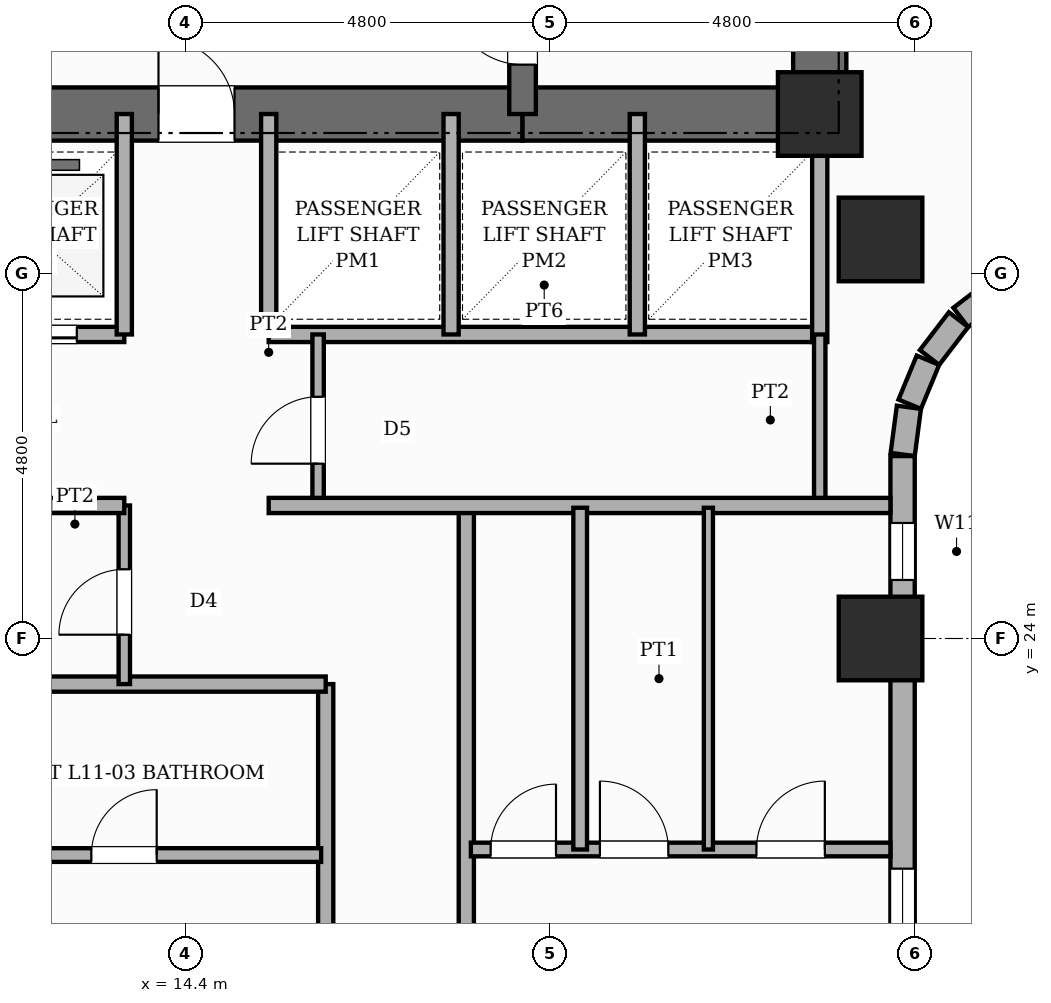
"""IFC4 building model, lengths in metres.
Left out: names, types, materials, properties, quantities, classifications, styles, units other than length and angle.
Written with IfcOpenShell. Run it as: python <this file> out.ifc"""

import sys

from ifc_helpers import new_model, si_unit, direction, frame, frame_2d, origin, origin_2d, place, context, subcontext, project, spatial, rectangle, extrude, element, fill, save


model = new_model("IFC4")
c1 = context("Model", 3, precision=1e-05, world=origin(), true_north=direction((0.0, 1.0)))
c2 = subcontext(c1, "Body", "Model", "MODEL_VIEW")
j1 = project(units=[si_unit("LENGTHUNIT", "METRE"), si_unit("PLANEANGLEUNIT", "RADIAN")], contexts=[c1])
p1 = place(None, origin())
s1 = spatial("IfcSite", under=j1, at=p1, CompositionType="ELEMENT")
p2 = place(p1, origin())
s2 = spatial("IfcBuilding", under=s1, at=p2, CompositionType="ELEMENT")
p3 = place(p2, frame((0.0, 0.0, 46.6)))
s3 = spatial("IfcBuildingStorey", under=s2, at=p3, CompositionType="ELEMENT", Elevation=46.6)
p4 = place(p3, frame((22.75, 30.55, 0.0), z_axis=(0.0, 0.0, 1.0), x_axis=(0.0, 1.0, 0.0)))
e1 = element("IfcWall", 1, at=p4, inside=s3, PredefinedType="SHEAR", context=c2, shape_type="SweptSolid", body=[
    extrude(rectangle(XDim=15.6, YDim=0.7, at=frame_2d((7.8, 0.0))), origin(), (0.0, 0.0, 1.0), 3.6),
])
p5 = place(p4, frame((10.8, 0.0, 0.0)))
e2 = element("IfcOpeningElement", 2, at=p5, cuts=e1, PredefinedType="OPENING", context=c2, shape_type="SweptSolid", body=[
    extrude(rectangle(XDim=1.0, YDim=2.15, at=frame_2d((0.5, 1.075))), frame((0.0, 0.36, 0.0), z_axis=(0.0, -1.0, 0.0), x_axis=(1.0, 0.0, 0.0)), (0.0, 0.0, 1.0), 0.72),
])
p6 = place(p3, frame((9.96, 30.9, 0.0), z_axis=(0.0, 0.0, 1.0), x_axis=(1.0, 0.0, 0.0)))
e3 = element("IfcWall", 3, at=p6, inside=s3, PredefinedType="SHEAR", context=c2, shape_type="SweptSolid", body=[
    extrude(rectangle(XDim=8.88, YDim=0.7, at=frame_2d((4.44, 0.0))), origin(), (0.0, 0.0, 1.0), 3.6),
])
p7 = place(p6, frame((4.09, 0.0, 0.0)))
e4 = element("IfcOpeningElement", 4, at=p7, cuts=e3, PredefinedType="OPENING", context=c2, shape_type="SweptSolid", body=[
    extrude(rectangle(XDim=1.0, YDim=2.15, at=frame_2d((0.5, 1.075))), frame((0.0, 0.36, 0.0), z_axis=(0.0, -1.0, 0.0), x_axis=(1.0, 0.0, 0.0)), (0.0, 0.0, 1.0), 0.72),
])
p8 = place(p3, frame((18.84, 30.9, 0.0), z_axis=(0.0, 0.0, 1.0), x_axis=(1.0, 0.0, 0.0)))
e5 = element("IfcWall", 5, at=p8, inside=s3, PredefinedType="SHEAR", context=c2, shape_type="SweptSolid", body=[
    extrude(rectangle(XDim=3.91, YDim=0.7, at=frame_2d((1.955, 0.0))), origin(), (0.0, 0.0, 1.0), 3.6),
])
p9 = place(p3, frame((18.84, 30.9, 0.0), z_axis=(0.0, 0.0, 1.0), x_axis=(0.0, 1.0, 0.0)))
e6 = element("IfcWall", 6, at=p9, inside=s3, PredefinedType="SHEAR", context=c2, shape_type="SweptSolid", body=[
    extrude(rectangle(XDim=14.9, YDim=0.35, at=frame_2d((7.45, 0.0))), origin(), (0.0, 0.0, 1.0), 3.6),
])
p10 = place(p9, frame((0.65, 0.0, 0.0)))
e7 = element("IfcOpeningElement", 7, at=p10, cuts=e6, PredefinedType="OPENING", context=c2, shape_type="SweptSolid", body=[
    extrude(rectangle(XDim=0.95, YDim=2.1, at=frame_2d((0.475, 1.05))), frame((0.0, 0.185, 0.0), z_axis=(0.0, -1.0, 0.0), x_axis=(1.0, 0.0, 0.0)), (0.0, 0.0, 1.0), 0.37),
])
p11 = place(p9, frame((10.45, 0.0, 0.0)))
e8 = element("IfcOpeningElement", 8, at=p11, cuts=e6, PredefinedType="OPENING", context=c2, shape_type="SweptSolid", body=[
    extrude(rectangle(XDim=1.0, YDim=2.15, at=frame_2d((0.5, 1.075))), frame((0.0, 0.185, 0.0), z_axis=(0.0, -1.0, 0.0), x_axis=(1.0, 0.0, 0.0)), (0.0, 0.0, 1.0), 0.37),
])
for number, where, z_axis, x_axis in (
    (9, (22.75, 30.9, 0.0), (0.0, 0.0, 1.0), (1.0, 0.0, 0.0)),
    (10, (23.55, 24.0, 0.0), (0.0, 0.0, 1.0), (1.0, 0.0, 0.0)),
    (11, (23.55, 29.25, 0.0), (0.0, 0.0, 1.0), (1.0, 0.0, 0.0)),
):
    element("IfcColumn", number, at=place(p3, frame(where, z_axis=z_axis, x_axis=x_axis)), inside=s3, PredefinedType="COLUMN", context=c2, shape_type="SweptSolid", body=[
        extrude(rectangle(XDim=1.1, YDim=1.1, at=origin_2d()), origin(), (0.0, 0.0, 1.0), 3.6),
    ])
for number, where, z_axis, x_axis in (
    (12, (25.103, 28.605, 0.0), (0.0, 0.0, 1.0), (-0.793, -0.609, 0.0)),
    (13, (24.576, 28.195, 0.0), (0.0, 0.0, 1.0), (-0.609, -0.793, 0.0)),
):
    element("IfcWall", number, at=place(p3, frame(where, z_axis=z_axis, x_axis=x_axis)), inside=s3, PredefinedType="STANDARD", context=c2, shape_type="SweptSolid", body=[
        extrude(rectangle(XDim=0.626, YDim=0.32, at=frame_2d((0.313, 0.0))), origin(), (0.0, 0.0, 1.0), 3.35),
    ])
p12 = place(p3, frame((24.174, 27.661, 0.0), z_axis=(0.0, 0.0, 1.0), x_axis=(-0.382455093999, -0.923974080304, 0.0)))
e14 = element("IfcWall", 14, at=p12, inside=s3, PredefinedType="STANDARD", context=c2, shape_type="SweptSolid", body=[
    extrude(rectangle(XDim=0.626, YDim=0.32, at=frame_2d((0.313, 0.0))), origin(), (0.0, 0.0, 1.0), 3.35),
])
p13 = place(p3, frame((23.923, 27.042, 0.0), z_axis=(0.0, 0.0, 1.0), x_axis=(-0.130555323746, -0.9914410257, 0.0)))
e15 = element("IfcWall", 15, at=p13, inside=s3, PredefinedType="STANDARD", context=c2, shape_type="SweptSolid", body=[
    extrude(rectangle(XDim=0.626, YDim=0.32, at=frame_2d((0.313, 0.0))), origin(), (0.0, 0.0, 1.0), 2.53),
])
p14 = place(p3, frame((23.84, 26.4, 0.0), z_axis=(0.0, 0.0, 1.0), x_axis=(0.0, -1.0, 0.0)))
e16 = element("IfcWall", 16, at=p14, inside=s3, PredefinedType="STANDARD", context=c2, shape_type="SweptSolid", body=[
    extrude(rectangle(XDim=19.2, YDim=0.32, at=frame_2d((9.6, 0.0))), origin(), (0.0, 0.0, 1.0), 2.53),
])
p15 = place(p14, frame((13.7, 0.0, 0.65)))
e17 = element("IfcOpeningElement", 17, at=p15, cuts=e16, PredefinedType="OPENING", context=c2, shape_type="SweptSolid", body=[
    extrude(rectangle(XDim=1.4, YDim=1.1, at=frame_2d((0.7, 0.55))), frame((0.0, 0.17, 0.0), z_axis=(0.0, -1.0, 0.0), x_axis=(1.0, 0.0, 0.0)), (0.0, 0.0, 1.0), 0.34),
])
p16 = place(p14, frame((0.88, 0.0, 0.45)))
e18 = element("IfcOpeningElement", 18, at=p16, cuts=e16, PredefinedType="OPENING", context=c2, shape_type="SweptSolid", body=[
    extrude(rectangle(XDim=0.75, YDim=1.8, at=frame_2d((0.375, 0.9))), frame((0.0, 0.17, 0.0), z_axis=(0.0, -1.0, 0.0), x_axis=(1.0, 0.0, 0.0)), (0.0, 0.0, 1.0), 0.34),
])
p17 = place(p14, frame((5.428, 0.0, 0.45)))
e19 = element("IfcOpeningElement", 19, at=p17, cuts=e16, PredefinedType="OPENING", context=c2, shape_type="SweptSolid", body=[
    extrude(rectangle(XDim=0.95, YDim=1.8, at=frame_2d((0.475, 0.9))), frame((0.0, 0.17, 0.0), z_axis=(0.0, -1.0, 0.0), x_axis=(1.0, 0.0, 0.0)), (0.0, 0.0, 1.0), 0.34),
])
p18 = place(p3, frame((6.05, 28.0, 0.0), z_axis=(0.0, 0.0, 1.0), x_axis=(1.0, 0.0, 0.0)))
e20 = element("IfcWall", 20, at=p18, inside=s3, PredefinedType="POLYGONAL", context=c2, shape_type="SweptSolid", body=[
    extrude(rectangle(XDim=7.55, YDim=0.2, at=frame_2d((3.775, 0.0))), origin(), (0.0, 0.0, 1.0), 3.35),
])
p19 = place(p18, frame((0.925, 0.0, 0.0)))
e21 = element("IfcOpeningElement", 21, at=p19, cuts=e20, PredefinedType="OPENING", context=c2, shape_type="SweptSolid", body=[
    extrude(rectangle(XDim=1.1, YDim=2.15, at=frame_2d((0.55, 1.075))), frame((0.0, 0.11, 0.0), z_axis=(0.0, -1.0, 0.0), x_axis=(1.0, 0.0, 0.0)), (0.0, 0.0, 1.0), 0.22),
])
p20 = place(p18, frame((3.375, 0.0, 0.0)))
e22 = element("IfcOpeningElement", 22, at=p20, cuts=e20, PredefinedType="OPENING", context=c2, shape_type="SweptSolid", body=[
    extrude(rectangle(XDim=1.1, YDim=2.15, at=frame_2d((0.55, 1.075))), frame((0.0, 0.11, 0.0), z_axis=(0.0, -1.0, 0.0), x_axis=(1.0, 0.0, 0.0)), (0.0, 0.0, 1.0), 0.22),
])
p21 = place(p18, frame((5.825, 0.0, 0.0)))
e23 = element("IfcOpeningElement", 23, at=p21, cuts=e20, PredefinedType="OPENING", context=c2, shape_type="SweptSolid", body=[
    extrude(rectangle(XDim=1.1, YDim=2.15, at=frame_2d((0.55, 1.075))), frame((0.0, 0.11, 0.0), z_axis=(0.0, -1.0, 0.0), x_axis=(1.0, 0.0, 0.0)), (0.0, 0.0, 1.0), 0.22),
])
p22 = place(p3, frame((15.5, 28.0, 0.0), z_axis=(0.0, 0.0, 1.0), x_axis=(1.0, 0.0, 0.0)))
e24 = element("IfcWall", 24, at=p22, inside=s3, PredefinedType="POLYGONAL", context=c2, shape_type="SweptSolid", body=[
    extrude(rectangle(XDim=7.25, YDim=0.2, at=frame_2d((3.625, 0.0))), origin(), (0.0, 0.0, 1.0), 3.35),
])
p23 = place(p3, frame((22.75, 27.9, 0.0), z_axis=(0.0, 0.0, 1.0), x_axis=(0.0, 1.0, 0.0)))
e25 = element("IfcWall", 25, at=p23, inside=s3, PredefinedType="POLYGONAL", context=c2, shape_type="SweptSolid", body=[
    extrude(rectangle(XDim=3.0, YDim=0.2, at=frame_2d((1.5, 0.0))), origin(), (0.0, 0.0, 1.0), 3.35),
])
for number, where, z_axis, x_axis in (
    (26, (13.6, 28.0, 0.0), (0.0, 0.0, 1.0), (0.0, 1.0, 0.0)),
    (27, (15.5, 28.0, 0.0), (0.0, 0.0, 1.0), (0.0, 1.0, 0.0)),
    (28, (17.9, 28.0, 0.0), (0.0, 0.0, 1.0), (0.0, 1.0, 0.0)),
    (29, (20.35, 28.0, 0.0), (0.0, 0.0, 1.0), (0.0, 1.0, 0.0)),
):
    element("IfcWall", number, at=place(p3, frame(where, z_axis=z_axis, x_axis=x_axis)), inside=s3, PredefinedType="POLYGONAL", context=c2, shape_type="SweptSolid", body=[
        extrude(rectangle(XDim=2.9, YDim=0.2, at=frame_2d((1.45, 0.0))), origin(), (0.0, 0.0, 1.0), 3.35),
    ])
p24 = place(p3, frame((16.15, 25.75, 0.0), z_axis=(0.0, 0.0, 1.0), x_axis=(0.0, 1.0, 0.0)))
e30 = element("IfcWall", 30, at=p24, inside=s3, PredefinedType="PARTITIONING", context=c2, shape_type="SweptSolid", body=[
    extrude(rectangle(XDim=2.25, YDim=0.15, at=frame_2d((1.125, 0.0))), origin(), (0.0, 0.0, 1.0), 3.35),
])
p25 = place(p24, frame((0.55, 0.0, 0.0)))
e31 = element("IfcOpeningElement", 31, at=p25, cuts=e30, PredefinedType="OPENING", context=c2, shape_type="SweptSolid", body=[
    extrude(rectangle(XDim=0.88, YDim=2.1, at=frame_2d((0.44, 1.05))), frame((0.0, 0.085, 0.0), z_axis=(0.0, -1.0, 0.0), x_axis=(1.0, 0.0, 0.0)), (0.0, 0.0, 1.0), 0.17),
])
p26 = place(p3, frame((22.75, 25.75, 0.0), z_axis=(0.0, 0.0, 1.0), x_axis=(0.0, 1.0, 0.0)))
e32 = element("IfcWall", 32, at=p26, inside=s3, PredefinedType="PARTITIONING", context=c2, shape_type="SweptSolid", body=[
    extrude(rectangle(XDim=2.25, YDim=0.15, at=frame_2d((1.125, 0.0))), origin(), (0.0, 0.0, 1.0), 3.35),
])
p27 = place(p3, frame((16.25, 5.12, 0.0), z_axis=(0.0, 0.0, 1.0), x_axis=(0.0, 1.0, 0.0)))
e33 = element("IfcWall", 33, at=p27, inside=s3, PredefinedType="PARTITIONING", context=c2, shape_type="SweptSolid", body=[
    extrude(rectangle(XDim=18.28, YDim=0.2, at=frame_2d((9.14, 0.0))), origin(), (0.0, 0.0, 1.0), 3.35),
])
p28 = place(p27, frame((1.042, 0.0, 0.0)))
e34 = element("IfcOpeningElement", 34, at=p28, cuts=e33, PredefinedType="OPENING", context=c2, shape_type="SweptSolid", body=[
    extrude(rectangle(XDim=0.98, YDim=2.18, at=frame_2d((0.49, 1.09))), frame((0.0, 0.11, 0.0), z_axis=(0.0, -1.0, 0.0), x_axis=(1.0, 0.0, 0.0)), (0.0, 0.0, 1.0), 0.22),
])
p29 = place(p27, frame((6.28, 0.0, 0.0)))
e35 = element("IfcOpeningElement", 35, at=p29, cuts=e33, PredefinedType="OPENING", context=c2, shape_type="SweptSolid", body=[
    extrude(rectangle(XDim=0.98, YDim=2.18, at=frame_2d((0.49, 1.09))), frame((0.0, 0.11, 0.0), z_axis=(0.0, -1.0, 0.0), x_axis=(1.0, 0.0, 0.0)), (0.0, 0.0, 1.0), 0.22),
])
p30 = place(p27, frame((13.04, 0.0, 0.0)))
e36 = element("IfcOpeningElement", 36, at=p30, cuts=e33, PredefinedType="OPENING", context=c2, shape_type="SweptSolid", body=[
    extrude(rectangle(XDim=0.98, YDim=2.18, at=frame_2d((0.49, 1.09))), frame((0.0, 0.11, 0.0), z_axis=(0.0, -1.0, 0.0), x_axis=(1.0, 0.0, 0.0)), (0.0, 0.0, 1.0), 0.22),
])
p31 = place(p3, frame((18.1, 5.12, 0.0), z_axis=(0.0, 0.0, 1.0), x_axis=(0.0, 1.0, 0.0)))
e37 = element("IfcWall", 37, at=p31, inside=s3, PredefinedType="PARTITIONING", context=c2, shape_type="SweptSolid", body=[
    extrude(rectangle(XDim=20.63, YDim=0.2, at=frame_2d((10.315, 0.0))), origin(), (0.0, 0.0, 1.0), 3.35),
])
p32 = place(p31, frame((1.043, 0.0, 0.0)))
e38 = element("IfcOpeningElement", 38, at=p32, cuts=e37, PredefinedType="OPENING", context=c2, shape_type="SweptSolid", body=[
    extrude(rectangle(XDim=0.98, YDim=2.18, at=frame_2d((0.49, 1.09))), frame((0.0, 0.11, 0.0), z_axis=(0.0, -1.0, 0.0), x_axis=(1.0, 0.0, 0.0)), (0.0, 0.0, 1.0), 0.22),
])
p33 = place(p31, frame((12.422, 0.0, 0.0)))
e39 = element("IfcOpeningElement", 39, at=p33, cuts=e37, PredefinedType="OPENING", context=c2, shape_type="SweptSolid", body=[
    extrude(rectangle(XDim=0.98, YDim=2.18, at=frame_2d((0.49, 1.09))), frame((0.0, 0.11, 0.0), z_axis=(0.0, -1.0, 0.0), x_axis=(1.0, 0.0, 0.0)), (0.0, 0.0, 1.0), 0.22),
])
p34 = place(p3, frame((5.12, 23.4, 0.0), z_axis=(0.0, 0.0, 1.0), x_axis=(1.0, 0.0, 0.0)))
e40 = element("IfcWall", 40, at=p34, inside=s3, PredefinedType="PARTITIONING", context=c2, shape_type="SweptSolid", body=[
    extrude(rectangle(XDim=11.13, YDim=0.2, at=frame_2d((5.565, 0.0))), origin(), (0.0, 0.0, 1.0), 3.35),
])
p35 = place(p3, frame((15.5, 25.75, 0.0), z_axis=(0.0, 0.0, 1.0), x_axis=(1.0, 0.0, 0.0)))
e41 = element("IfcWall", 41, at=p35, inside=s3, PredefinedType="PARTITIONING", context=c2, shape_type="SweptSolid", body=[
    extrude(rectangle(XDim=8.18, YDim=0.2, at=frame_2d((4.09, 0.0))), origin(), (0.0, 0.0, 1.0), 3.35),
])
p36 = place(p3, frame((13.6, 23.4, 0.0), z_axis=(0.0, 0.0, 1.0), x_axis=(0.0, 1.0, 0.0)))
e42 = element("IfcWall", 42, at=p36, inside=s3, PredefinedType="PARTITIONING", context=c2, shape_type="SweptSolid", body=[
    extrude(rectangle(XDim=2.35, YDim=0.15, at=frame_2d((1.175, 0.0))), origin(), (0.0, 0.0, 1.0), 3.35),
])
p37 = place(p36, frame((0.65, 0.0, 0.0)))
e43 = element("IfcOpeningElement", 43, at=p37, cuts=e42, PredefinedType="OPENING", context=c2, shape_type="SweptSolid", body=[
    extrude(rectangle(XDim=0.86, YDim=2.1, at=frame_2d((0.43, 1.05))), frame((0.0, 0.085, 0.0), z_axis=(0.0, -1.0, 0.0), x_axis=(1.0, 0.0, 0.0)), (0.0, 0.0, 1.0), 0.17),
])
p38 = place(p3, frame((5.12, 25.75, 0.0), z_axis=(0.0, 0.0, 1.0), x_axis=(1.0, 0.0, 0.0)))
e44 = element("IfcWall", 44, at=p38, inside=s3, PredefinedType="PARTITIONING", context=c2, shape_type="SweptSolid", body=[
    extrude(rectangle(XDim=8.48, YDim=0.2, at=frame_2d((4.24, 0.0))), origin(), (0.0, 0.0, 1.0), 3.35),
])
p39 = place(p3, frame((5.12, 21.151, 0.0), z_axis=(0.0, 0.0, 1.0), x_axis=(1.0, 0.0, 0.0)))
e45 = element("IfcWall", 45, at=p39, inside=s3, PredefinedType="PLUMBINGWALL", context=c2, shape_type="SweptSolid", body=[
    extrude(rectangle(XDim=11.07, YDim=0.18, at=frame_2d((5.535, 0.0))), origin(), (0.0, 0.0, 1.0), 3.35),
])
p40 = place(p39, frame((2.431, 0.0, 0.0)))
e46 = element("IfcOpeningElement", 46, at=p40, cuts=e45, PredefinedType="OPENING", context=c2, shape_type="SweptSolid", body=[
    extrude(rectangle(XDim=0.9, YDim=2.15, at=frame_2d((0.45, 1.075))), frame((0.0, 0.1, 0.0), z_axis=(0.0, -1.0, 0.0), x_axis=(1.0, 0.0, 0.0)), (0.0, 0.0, 1.0), 0.2),
])
p41 = place(p39, frame((8.046, 0.0, 0.0)))
e47 = element("IfcOpeningElement", 47, at=p41, cuts=e45, PredefinedType="OPENING", context=c2, shape_type="SweptSolid", body=[
    extrude(rectangle(XDim=0.86, YDim=2.1, at=frame_2d((0.43, 1.05))), frame((0.0, 0.1, 0.0), z_axis=(0.0, -1.0, 0.0), x_axis=(1.0, 0.0, 0.0)), (0.0, 0.0, 1.0), 0.2),
])
p42 = place(p3, frame((18.16, 21.224, 0.0), z_axis=(0.0, 0.0, 1.0), x_axis=(1.0, 0.0, 0.0)))
e48 = element("IfcWall", 48, at=p42, inside=s3, PredefinedType="PLUMBINGWALL", context=c2, shape_type="SweptSolid", body=[
    extrude(rectangle(XDim=5.52, YDim=0.18, at=frame_2d((2.76, 0.0))), origin(), (0.0, 0.0, 1.0), 3.35),
])
p43 = place(p42, frame((0.26, 0.0, 0.0)))
e49 = element("IfcOpeningElement", 49, at=p43, cuts=e48, PredefinedType="OPENING", context=c2, shape_type="SweptSolid", body=[
    extrude(rectangle(XDim=0.86, YDim=2.1, at=frame_2d((0.43, 1.05))), frame((0.0, 0.1, 0.0), z_axis=(0.0, -1.0, 0.0), x_axis=(1.0, 0.0, 0.0)), (0.0, 0.0, 1.0), 0.2),
])
p44 = place(p42, frame((1.698, 0.0, 0.0)))
e50 = element("IfcOpeningElement", 50, at=p44, cuts=e48, PredefinedType="OPENING", context=c2, shape_type="SweptSolid", body=[
    extrude(rectangle(XDim=0.9, YDim=2.15, at=frame_2d((0.45, 1.075))), frame((0.0, 0.1, 0.0), z_axis=(0.0, -1.0, 0.0), x_axis=(1.0, 0.0, 0.0)), (0.0, 0.0, 1.0), 0.2),
])
p45 = place(p42, frame((3.757, 0.0, 0.0)))
e51 = element("IfcOpeningElement", 51, at=p45, cuts=e48, PredefinedType="OPENING", context=c2, shape_type="SweptSolid", body=[
    extrude(rectangle(XDim=0.9, YDim=2.15, at=frame_2d((0.45, 1.075))), frame((0.0, 0.1, 0.0), z_axis=(0.0, -1.0, 0.0), x_axis=(1.0, 0.0, 0.0)), (0.0, 0.0, 1.0), 0.2),
])
p46 = place(p3, frame((19.598, 21.224, 0.0), z_axis=(0.0, 0.0, 1.0), x_axis=(0.0, 1.0, 0.0)))
e52 = element("IfcWall", 52, at=p46, inside=s3, PredefinedType="PLUMBINGWALL", context=c2, shape_type="SweptSolid", body=[
    extrude(rectangle(XDim=4.496, YDim=0.18, at=frame_2d((2.248, 0.0))), origin(), (0.0, 0.0, 1.0), 3.35),
])
p47 = place(p3, frame((21.285, 21.224, 0.0), z_axis=(0.0, 0.0, 1.0), x_axis=(0.0, 1.0, 0.0)))
e53 = element("IfcWall", 53, at=p47, inside=s3, PredefinedType="PARTITIONING", context=c2, shape_type="SweptSolid", body=[
    extrude(rectangle(XDim=4.496, YDim=0.12, at=frame_2d((2.248, 0.0))), origin(), (0.0, 0.0, 1.0), 3.35),
])
p48 = place(p16, origin())
e54 = element("IfcWindow", 54, at=p48, inside=s3, PartitioningType="SINGLE_PANEL", PredefinedType="WINDOW", context=c2, shape_type="SweptSolid", body=[
    extrude(rectangle(XDim=0.75, YDim=1.8, at=frame_2d((0.375, 0.9))), frame((0.0, 0.03, 0.0), z_axis=(0.0, -1.0, 0.0), x_axis=(1.0, 0.0, 0.0)), (0.0, 0.0, 1.0), 0.06),
])
fill(e18, e54)
p49 = place(p17, origin())
e55 = element("IfcWindow", 55, at=p49, inside=s3, PartitioningType="SINGLE_PANEL", PredefinedType="WINDOW", context=c2, shape_type="SweptSolid", body=[
    extrude(rectangle(XDim=0.95, YDim=1.8, at=frame_2d((0.475, 0.9))), frame((0.0, 0.03, 0.0), z_axis=(0.0, -1.0, 0.0), x_axis=(1.0, 0.0, 0.0)), (0.0, 0.0, 1.0), 0.06),
])
fill(e19, e55)
p50 = place(p10, origin())
e56 = element("IfcDoor", 56, at=p50, inside=s3, OperationType="SINGLE_SWING_RIGHT", PredefinedType="DOOR", context=c2, shape_type="SweptSolid", body=[
    extrude(rectangle(XDim=0.95, YDim=2.1, at=frame_2d((0.475, 1.05))), frame((0.0, 0.025, 0.0), z_axis=(0.0, -1.0, 0.0), x_axis=(1.0, 0.0, 0.0)), (0.0, 0.0, 1.0), 0.05),
])
fill(e7, e56)
p51 = place(p7, origin())
e57 = element("IfcDoor", 57, at=p51, inside=s3, OperationType="SINGLE_SWING_LEFT", PredefinedType="DOOR", context=c2, shape_type="SweptSolid", body=[
    extrude(rectangle(XDim=1.0, YDim=2.15, at=frame_2d((0.5, 1.075))), frame((0.0, 0.025, 0.0), z_axis=(0.0, -1.0, 0.0), x_axis=(1.0, 0.0, 0.0)), (0.0, 0.0, 1.0), 0.05),
])
fill(e4, e57)
p52 = place(p21, origin())
e58 = element("IfcDoor", 58, at=p52, inside=s3, OperationType="SLIDING_TO_LEFT", PredefinedType="DOOR", context=c2, shape_type="SweptSolid", body=[
    extrude(rectangle(XDim=1.1, YDim=2.15, at=frame_2d((0.55, 1.075))), frame((0.0, 0.025, 0.0), z_axis=(0.0, -1.0, 0.0), x_axis=(1.0, 0.0, 0.0)), (0.0, 0.0, 1.0), 0.05),
])
fill(e23, e58)
p53 = place(p25, origin())
e59 = element("IfcDoor", 59, at=p53, inside=s3, OperationType="SINGLE_SWING_LEFT", PredefinedType="DOOR", context=c2, shape_type="SweptSolid", body=[
    extrude(rectangle(XDim=0.88, YDim=2.1, at=frame_2d((0.44, 1.05))), frame((0.0, 0.025, 0.0), z_axis=(0.0, -1.0, 0.0), x_axis=(1.0, 0.0, 0.0)), (0.0, 0.0, 1.0), 0.05),
])
fill(e31, e59)
p54 = place(p37, origin())
e60 = element("IfcDoor", 60, at=p54, inside=s3, OperationType="SINGLE_SWING_LEFT", PredefinedType="DOOR", context=c2, shape_type="SweptSolid", body=[
    extrude(rectangle(XDim=0.86, YDim=2.1, at=frame_2d((0.43, 1.05))), frame((0.0, 0.025, 0.0), z_axis=(0.0, -1.0, 0.0), x_axis=(1.0, 0.0, 0.0)), (0.0, 0.0, 1.0), 0.05),
])
fill(e43, e60)
p55 = place(p41, origin())
e61 = element("IfcDoor", 61, at=p55, inside=s3, OperationType="SINGLE_SWING_RIGHT", PredefinedType="DOOR", context=c2, shape_type="SweptSolid", body=[
    extrude(rectangle(XDim=0.86, YDim=2.1, at=frame_2d((0.43, 1.05))), frame((0.0, 0.025, 0.0), z_axis=(0.0, -1.0, 0.0), x_axis=(1.0, 0.0, 0.0)), (0.0, 0.0, 1.0), 0.05),
])
fill(e47, e61)
p56 = place(p43, origin())
e62 = element("IfcDoor", 62, at=p56, inside=s3, OperationType="SINGLE_SWING_RIGHT", PredefinedType="DOOR", context=c2, shape_type="SweptSolid", body=[
    extrude(rectangle(XDim=0.86, YDim=2.1, at=frame_2d((0.43, 1.05))), frame((0.0, 0.025, 0.0), z_axis=(0.0, -1.0, 0.0), x_axis=(1.0, 0.0, 0.0)), (0.0, 0.0, 1.0), 0.05),
])
fill(e49, e62)
p57 = place(p44, origin())
e63 = element("IfcDoor", 63, at=p57, inside=s3, OperationType="SINGLE_SWING_LEFT", PredefinedType="DOOR", context=c2, shape_type="SweptSolid", body=[
    extrude(rectangle(XDim=0.9, YDim=2.15, at=frame_2d((0.45, 1.075))), frame((0.0, 0.025, 0.0), z_axis=(0.0, -1.0, 0.0), x_axis=(1.0, 0.0, 0.0)), (0.0, 0.0, 1.0), 0.05),
])
fill(e50, e63)
p58 = place(p45, origin())
e64 = element("IfcDoor", 64, at=p58, inside=s3, OperationType="SINGLE_SWING_RIGHT", PredefinedType="DOOR", context=c2, shape_type="SweptSolid", body=[
    extrude(rectangle(XDim=0.9, YDim=2.15, at=frame_2d((0.45, 1.075))), frame((0.0, 0.025, 0.0), z_axis=(0.0, -1.0, 0.0), x_axis=(1.0, 0.0, 0.0)), (0.0, 0.0, 1.0), 0.05),
])
fill(e51, e64)
save(model, sys.argv[1])
